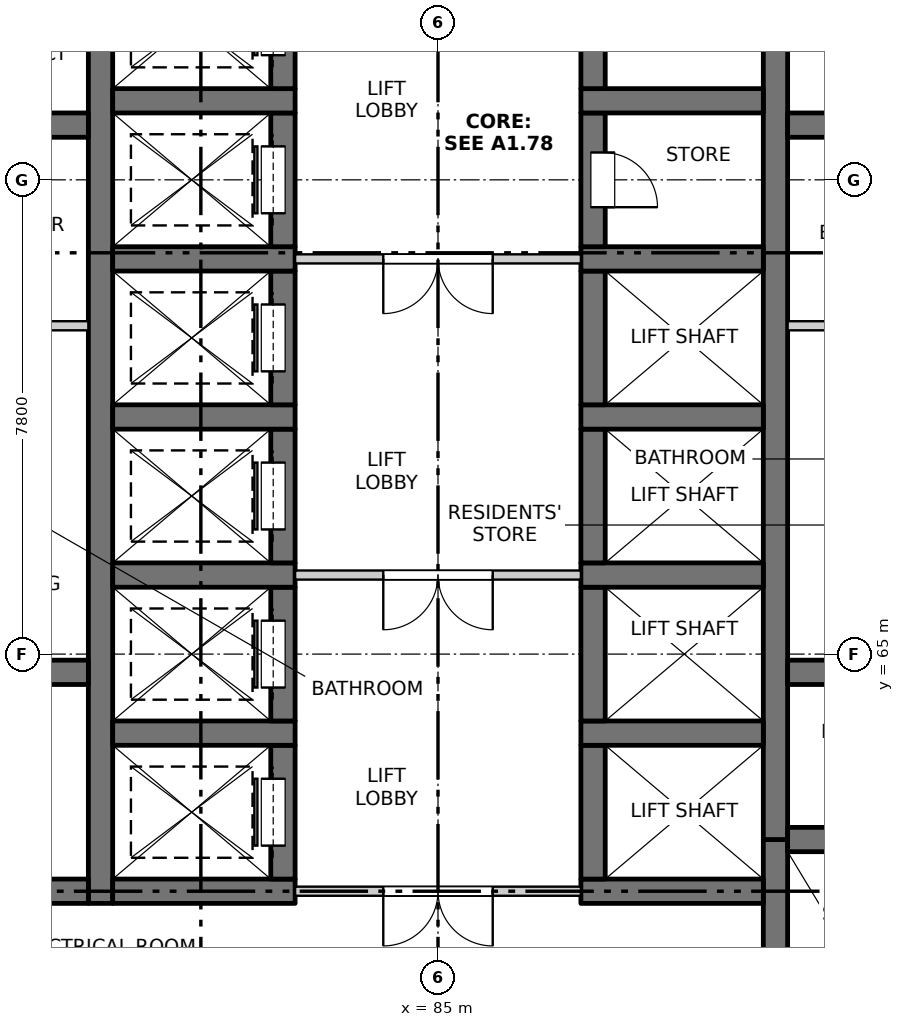
"""IFC4 building model, lengths in metres.
Left out: names, types, materials, properties, quantities, classifications, styles, units other than length and angle.
Written with IfcOpenShell. Run it as: python <this file> out.ifc"""

import sys

from ifc_helpers import new_model, si_unit, direction, frame, frame_2d, origin, place, context, subcontext, project, spatial, rectangle, extrude, element, fill, save


model = new_model("IFC4")
c1 = context("Model", 3, precision=1e-05, world=origin(), true_north=direction((0.0, 1.0)))
c2 = subcontext(c1, "Body", "Model", "MODEL_VIEW")
j1 = project(units=[si_unit("LENGTHUNIT", "METRE"), si_unit("PLANEANGLEUNIT", "RADIAN")], contexts=[c1])
p1 = place(None, origin())
s1 = spatial("IfcSite", under=j1, at=p1, CompositionType="ELEMENT")
p2 = place(p1, origin())
s2 = spatial("IfcBuilding", under=s1, at=p2, CompositionType="ELEMENT")
p3 = place(p2, frame((0.0, 0.0, 58.0)))
s3 = spatial("IfcBuildingStorey", under=s2, at=p3, CompositionType="ELEMENT", Elevation=58.0)
p4 = place(p3, frame((79.45, 60.9, -0.25), z_axis=(0.0, 0.0, 1.0), x_axis=(0.0, 1.0, 0.0)))
e1 = element("IfcWall", 1, at=p4, inside=s3, PredefinedType="SOLIDWALL", context=c2, shape_type="SweptSolid", body=[
    extrude(rectangle(XDim=16.4, YDim=0.4, at=frame_2d((8.2, 0.0))), origin(), (0.0, 0.0, 1.0), 3.4),
])
p5 = place(p3, frame((90.55, 55.6, -0.25), z_axis=(0.0, 0.0, 1.0), x_axis=(0.0, 1.0, 0.0)))
e2 = element("IfcWall", 2, at=p5, inside=s3, PredefinedType="SOLIDWALL", context=c2, shape_type="SweptSolid", body=[
    extrude(rectangle(XDim=6.35, YDim=0.4, at=frame_2d((3.175, 0.0))), origin(), (0.0, 0.0, 1.0), 3.4),
])
p6 = place(p5, frame((0.1, 0.0, 0.25)))
e3 = element("IfcOpeningElement", 3, at=p6, cuts=e2, PredefinedType="OPENING", context=c2, shape_type="SweptSolid", body=[
    extrude(rectangle(XDim=1.2, YDim=2.1, at=frame_2d((0.6, 1.05))), frame((0.0, 0.21, 0.0), z_axis=(0.0, -1.0, 0.0), x_axis=(1.0, 0.0, 0.0)), (0.0, 0.0, 1.0), 0.42),
])
p7 = place(p3, frame((90.55, 61.95, -0.25), z_axis=(0.0, 0.0, 1.0), x_axis=(0.0, 1.0, 0.0)))
e4 = element("IfcWall", 4, at=p7, inside=s3, PredefinedType="SOLIDWALL", context=c2, shape_type="SweptSolid", body=[
    extrude(rectangle(XDim=15.35, YDim=0.4, at=frame_2d((7.675, 0.0))), origin(), (0.0, 0.0, 1.0), 3.4),
])
p8 = place(p3, frame((79.65, 61.1, -0.25), z_axis=(0.0, 0.0, 1.0), x_axis=(1.0, 0.0, 0.0)))
e5 = element("IfcWall", 5, at=p8, inside=s3, PredefinedType="SOLIDWALL", context=c2, shape_type="SweptSolid", body=[
    extrude(rectangle(XDim=3.0, YDim=0.4, at=frame_2d((1.5, 0.0))), origin(), (0.0, 0.0, 1.0), 3.4),
])
p9 = place(p3, frame((82.45, 61.3, -0.25), z_axis=(0.0, 0.0, 1.0), x_axis=(0.0, 1.0, 0.0)))
e6 = element("IfcWall", 6, at=p9, inside=s3, PredefinedType="SOLIDWALL", context=c2, shape_type="SweptSolid", body=[
    extrude(rectangle(XDim=2.2, YDim=0.4, at=frame_2d((1.1, 0.0))), origin(), (0.0, 0.0, 1.0), 3.4),
])
p10 = place(p9, frame((0.55, 0.0, 0.25)))
e7 = element("IfcOpeningElement", 7, at=p10, cuts=e6, PredefinedType="OPENING", context=c2, shape_type="SweptSolid", body=[
    extrude(rectangle(XDim=1.1, YDim=2.1, at=frame_2d((0.55, 1.05))), frame((0.0, 0.21, 0.0), z_axis=(0.0, -1.0, 0.0), x_axis=(1.0, 0.0, 0.0)), (0.0, 0.0, 1.0), 0.42),
])
p11 = place(p3, frame((79.65, 63.7, -0.25), z_axis=(0.0, 0.0, 1.0), x_axis=(1.0, 0.0, 0.0)))
e8 = element("IfcWall", 8, at=p11, inside=s3, PredefinedType="SOLIDWALL", context=c2, shape_type="SweptSolid", body=[
    extrude(rectangle(XDim=3.0, YDim=0.4, at=frame_2d((1.5, 0.0))), origin(), (0.0, 0.0, 1.0), 3.4),
])
p12 = place(p3, frame((82.45, 63.9, -0.25), z_axis=(0.0, 0.0, 1.0), x_axis=(0.0, 1.0, 0.0)))
e9 = element("IfcWall", 9, at=p12, inside=s3, PredefinedType="SOLIDWALL", context=c2, shape_type="SweptSolid", body=[
    extrude(rectangle(XDim=2.2, YDim=0.4, at=frame_2d((1.1, 0.0))), origin(), (0.0, 0.0, 1.0), 3.4),
])
p13 = place(p12, frame((0.55, 0.0, 0.25)))
e10 = element("IfcOpeningElement", 10, at=p13, cuts=e9, PredefinedType="OPENING", context=c2, shape_type="SweptSolid", body=[
    extrude(rectangle(XDim=1.1, YDim=2.1, at=frame_2d((0.55, 1.05))), frame((0.0, 0.21, 0.0), z_axis=(0.0, -1.0, 0.0), x_axis=(1.0, 0.0, 0.0)), (0.0, 0.0, 1.0), 0.42),
])
p14 = place(p3, frame((79.65, 66.3, -0.25), z_axis=(0.0, 0.0, 1.0), x_axis=(1.0, 0.0, 0.0)))
e11 = element("IfcWall", 11, at=p14, inside=s3, PredefinedType="SOLIDWALL", context=c2, shape_type="SweptSolid", body=[
    extrude(rectangle(XDim=3.0, YDim=0.4, at=frame_2d((1.5, 0.0))), origin(), (0.0, 0.0, 1.0), 3.4),
])
p15 = place(p3, frame((82.45, 66.5, -0.25), z_axis=(0.0, 0.0, 1.0), x_axis=(0.0, 1.0, 0.0)))
e12 = element("IfcWall", 12, at=p15, inside=s3, PredefinedType="SOLIDWALL", context=c2, shape_type="SweptSolid", body=[
    extrude(rectangle(XDim=2.2, YDim=0.4, at=frame_2d((1.1, 0.0))), origin(), (0.0, 0.0, 1.0), 3.4),
])
p16 = place(p15, frame((0.55, 0.0, 0.25)))
e13 = element("IfcOpeningElement", 13, at=p16, cuts=e12, PredefinedType="OPENING", context=c2, shape_type="SweptSolid", body=[
    extrude(rectangle(XDim=1.1, YDim=2.1, at=frame_2d((0.55, 1.05))), frame((0.0, 0.21, 0.0), z_axis=(0.0, -1.0, 0.0), x_axis=(1.0, 0.0, 0.0)), (0.0, 0.0, 1.0), 0.42),
])
p17 = place(p3, frame((79.65, 68.9, -0.25), z_axis=(0.0, 0.0, 1.0), x_axis=(1.0, 0.0, 0.0)))
e14 = element("IfcWall", 14, at=p17, inside=s3, PredefinedType="SOLIDWALL", context=c2, shape_type="SweptSolid", body=[
    extrude(rectangle(XDim=3.0, YDim=0.4, at=frame_2d((1.5, 0.0))), origin(), (0.0, 0.0, 1.0), 3.4),
])
p18 = place(p3, frame((82.45, 69.1, -0.25), z_axis=(0.0, 0.0, 1.0), x_axis=(0.0, 1.0, 0.0)))
e15 = element("IfcWall", 15, at=p18, inside=s3, PredefinedType="SOLIDWALL", context=c2, shape_type="SweptSolid", body=[
    extrude(rectangle(XDim=2.2, YDim=0.4, at=frame_2d((1.1, 0.0))), origin(), (0.0, 0.0, 1.0), 3.4),
])
p19 = place(p18, frame((0.55, 0.0, 0.25)))
e16 = element("IfcOpeningElement", 16, at=p19, cuts=e15, PredefinedType="OPENING", context=c2, shape_type="SweptSolid", body=[
    extrude(rectangle(XDim=1.1, YDim=2.1, at=frame_2d((0.55, 1.05))), frame((0.0, 0.21, 0.0), z_axis=(0.0, -1.0, 0.0), x_axis=(1.0, 0.0, 0.0)), (0.0, 0.0, 1.0), 0.42),
])
p20 = place(p3, frame((79.65, 71.5, -0.25), z_axis=(0.0, 0.0, 1.0), x_axis=(1.0, 0.0, 0.0)))
e17 = element("IfcWall", 17, at=p20, inside=s3, PredefinedType="SOLIDWALL", context=c2, shape_type="SweptSolid", body=[
    extrude(rectangle(XDim=3.0, YDim=0.4, at=frame_2d((1.5, 0.0))), origin(), (0.0, 0.0, 1.0), 3.4),
])
p21 = place(p3, frame((82.45, 71.7, -0.25), z_axis=(0.0, 0.0, 1.0), x_axis=(0.0, 1.0, 0.0)))
e18 = element("IfcWall", 18, at=p21, inside=s3, PredefinedType="SOLIDWALL", context=c2, shape_type="SweptSolid", body=[
    extrude(rectangle(XDim=2.2, YDim=0.4, at=frame_2d((1.1, 0.0))), origin(), (0.0, 0.0, 1.0), 3.4),
])
p22 = place(p21, frame((0.55, 0.0, 0.25)))
e19 = element("IfcOpeningElement", 19, at=p22, cuts=e18, PredefinedType="OPENING", context=c2, shape_type="SweptSolid", body=[
    extrude(rectangle(XDim=1.1, YDim=2.1, at=frame_2d((0.55, 1.05))), frame((0.0, 0.21, 0.0), z_axis=(0.0, -1.0, 0.0), x_axis=(1.0, 0.0, 0.0)), (0.0, 0.0, 1.0), 0.42),
])
p23 = place(p3, frame((79.65, 74.1, -0.25), z_axis=(0.0, 0.0, 1.0), x_axis=(1.0, 0.0, 0.0)))
e20 = element("IfcWall", 20, at=p23, inside=s3, PredefinedType="SOLIDWALL", context=c2, shape_type="SweptSolid", body=[
    extrude(rectangle(XDim=3.0, YDim=0.4, at=frame_2d((1.5, 0.0))), origin(), (0.0, 0.0, 1.0), 3.4),
])
p24 = place(p3, frame((82.45, 74.3, -0.25), z_axis=(0.0, 0.0, 1.0), x_axis=(0.0, 1.0, 0.0)))
e21 = element("IfcWall", 21, at=p24, inside=s3, PredefinedType="SOLIDWALL", context=c2, shape_type="SweptSolid", body=[
    extrude(rectangle(XDim=2.2, YDim=0.4, at=frame_2d((1.1, 0.0))), origin(), (0.0, 0.0, 1.0), 3.4),
])
p25 = place(p24, frame((0.55, 0.0, 0.25)))
e22 = element("IfcOpeningElement", 22, at=p25, cuts=e21, PredefinedType="OPENING", context=c2, shape_type="SweptSolid", body=[
    extrude(rectangle(XDim=1.1, YDim=2.1, at=frame_2d((0.55, 1.05))), frame((0.0, 0.21, 0.0), z_axis=(0.0, -1.0, 0.0), x_axis=(1.0, 0.0, 0.0)), (0.0, 0.0, 1.0), 0.42),
])
p26 = place(p3, frame((87.35, 61.1, -0.25), z_axis=(0.0, 0.0, 1.0), x_axis=(1.0, 0.0, 0.0)))
e23 = element("IfcWall", 23, at=p26, inside=s3, PredefinedType="SOLIDWALL", context=c2, shape_type="SweptSolid", body=[
    extrude(rectangle(XDim=3.0, YDim=0.4, at=frame_2d((1.5, 0.0))), origin(), (0.0, 0.0, 1.0), 3.4),
])
p27 = place(p3, frame((87.55, 61.3, -0.25), z_axis=(0.0, 0.0, 1.0), x_axis=(0.0, 1.0, 0.0)))
e24 = element("IfcWall", 24, at=p27, inside=s3, PredefinedType="SOLIDWALL", context=c2, shape_type="SweptSolid", body=[
    extrude(rectangle(XDim=2.2, YDim=0.4, at=frame_2d((1.1, 0.0))), origin(), (0.0, 0.0, 1.0), 3.4),
])
p28 = place(p3, frame((87.35, 63.7, -0.25), z_axis=(0.0, 0.0, 1.0), x_axis=(1.0, 0.0, 0.0)))
e25 = element("IfcWall", 25, at=p28, inside=s3, PredefinedType="SOLIDWALL", context=c2, shape_type="SweptSolid", body=[
    extrude(rectangle(XDim=3.0, YDim=0.4, at=frame_2d((1.5, 0.0))), origin(), (0.0, 0.0, 1.0), 3.4),
])
p29 = place(p3, frame((87.55, 63.9, -0.25), z_axis=(0.0, 0.0, 1.0), x_axis=(0.0, 1.0, 0.0)))
e26 = element("IfcWall", 26, at=p29, inside=s3, PredefinedType="SOLIDWALL", context=c2, shape_type="SweptSolid", body=[
    extrude(rectangle(XDim=2.2, YDim=0.4, at=frame_2d((1.1, 0.0))), origin(), (0.0, 0.0, 1.0), 3.4),
])
p30 = place(p3, frame((87.35, 66.3, -0.25), z_axis=(0.0, 0.0, 1.0), x_axis=(1.0, 0.0, 0.0)))
e27 = element("IfcWall", 27, at=p30, inside=s3, PredefinedType="SOLIDWALL", context=c2, shape_type="SweptSolid", body=[
    extrude(rectangle(XDim=3.0, YDim=0.4, at=frame_2d((1.5, 0.0))), origin(), (0.0, 0.0, 1.0), 3.4),
])
p31 = place(p3, frame((87.55, 66.5, -0.25), z_axis=(0.0, 0.0, 1.0), x_axis=(0.0, 1.0, 0.0)))
e28 = element("IfcWall", 28, at=p31, inside=s3, PredefinedType="SOLIDWALL", context=c2, shape_type="SweptSolid", body=[
    extrude(rectangle(XDim=2.2, YDim=0.4, at=frame_2d((1.1, 0.0))), origin(), (0.0, 0.0, 1.0), 3.4),
])
p32 = place(p3, frame((87.35, 68.9, -0.25), z_axis=(0.0, 0.0, 1.0), x_axis=(1.0, 0.0, 0.0)))
e29 = element("IfcWall", 29, at=p32, inside=s3, PredefinedType="SOLIDWALL", context=c2, shape_type="SweptSolid", body=[
    extrude(rectangle(XDim=3.0, YDim=0.4, at=frame_2d((1.5, 0.0))), origin(), (0.0, 0.0, 1.0), 3.4),
])
p33 = place(p3, frame((87.55, 69.1, -0.25), z_axis=(0.0, 0.0, 1.0), x_axis=(0.0, 1.0, 0.0)))
e30 = element("IfcWall", 30, at=p33, inside=s3, PredefinedType="SOLIDWALL", context=c2, shape_type="SweptSolid", body=[
    extrude(rectangle(XDim=2.2, YDim=0.4, at=frame_2d((1.1, 0.0))), origin(), (0.0, 0.0, 1.0), 3.4),
])
p34 = place(p3, frame((87.35, 71.5, -0.25), z_axis=(0.0, 0.0, 1.0), x_axis=(1.0, 0.0, 0.0)))
e31 = element("IfcWall", 31, at=p34, inside=s3, PredefinedType="SOLIDWALL", context=c2, shape_type="SweptSolid", body=[
    extrude(rectangle(XDim=3.0, YDim=0.4, at=frame_2d((1.5, 0.0))), origin(), (0.0, 0.0, 1.0), 3.4),
])
p35 = place(p3, frame((87.55, 71.7, -0.25), z_axis=(0.0, 0.0, 1.0), x_axis=(0.0, 1.0, 0.0)))
e32 = element("IfcWall", 32, at=p35, inside=s3, PredefinedType="SOLIDWALL", context=c2, shape_type="SweptSolid", body=[
    extrude(rectangle(XDim=2.2, YDim=0.4, at=frame_2d((1.1, 0.0))), origin(), (0.0, 0.0, 1.0), 3.4),
])
p36 = place(p35, frame((0.65, 0.0, 0.25)))
e33 = element("IfcOpeningElement", 33, at=p36, cuts=e32, PredefinedType="OPENING", context=c2, shape_type="SweptSolid", body=[
    extrude(rectangle(XDim=0.9, YDim=2.1, at=frame_2d((0.45, 1.05))), frame((0.0, 0.21, 0.0), z_axis=(0.0, -1.0, 0.0), x_axis=(1.0, 0.0, 0.0)), (0.0, 0.0, 1.0), 0.42),
])
p37 = place(p3, frame((87.35, 74.1, -0.25), z_axis=(0.0, 0.0, 1.0), x_axis=(1.0, 0.0, 0.0)))
e34 = element("IfcWall", 34, at=p37, inside=s3, PredefinedType="SOLIDWALL", context=c2, shape_type="SweptSolid", body=[
    extrude(rectangle(XDim=3.0, YDim=0.4, at=frame_2d((1.5, 0.0))), origin(), (0.0, 0.0, 1.0), 3.4),
])
p38 = place(p3, frame((87.55, 74.3, -0.25), z_axis=(0.0, 0.0, 1.0), x_axis=(0.0, 1.0, 0.0)))
e35 = element("IfcWall", 35, at=p38, inside=s3, PredefinedType="SOLIDWALL", context=c2, shape_type="SweptSolid", body=[
    extrude(rectangle(XDim=2.2, YDim=0.4, at=frame_2d((1.1, 0.0))), origin(), (0.0, 0.0, 1.0), 3.4),
])
p39 = place(p38, frame((0.65, 0.0, 0.25)))
e36 = element("IfcOpeningElement", 36, at=p39, cuts=e35, PredefinedType="OPENING", context=c2, shape_type="SweptSolid", body=[
    extrude(rectangle(XDim=0.9, YDim=2.1, at=frame_2d((0.45, 1.05))), frame((0.0, 0.21, 0.0), z_axis=(0.0, -1.0, 0.0), x_axis=(1.0, 0.0, 0.0)), (0.0, 0.0, 1.0), 0.42),
])
for number, where, z_axis, x_axis in (
    (37, (75.6, 61.1, -0.25), (0.0, 0.0, 1.0), (1.0, 0.0, 0.0)),
    (38, (75.6, 64.7, -0.25), (0.0, 0.0, 1.0), (1.0, 0.0, 0.0)),
    (39, (75.6, 73.7, -0.25), (0.0, 0.0, 1.0), (1.0, 0.0, 0.0)),
    (40, (90.75, 61.95, -0.25), (0.0, 0.0, 1.0), (1.0, 0.0, 0.0)),
    (41, (90.75, 64.7, -0.25), (0.0, 0.0, 1.0), (1.0, 0.0, 0.0)),
    (42, (90.75, 73.7, -0.25), (0.0, 0.0, 1.0), (1.0, 0.0, 0.0)),
):
    element("IfcWall", number, at=place(p3, frame(where, z_axis=z_axis, x_axis=x_axis)), inside=s3, PredefinedType="SOLIDWALL", context=c2, shape_type="SweptSolid", body=[
        extrude(rectangle(XDim=3.65, YDim=0.4, at=frame_2d((1.825, 0.0))), origin(), (0.0, 0.0, 1.0), 3.4),
    ])
p40 = place(p3, frame((82.65, 61.1, 0.0), z_axis=(0.0, 0.0, 1.0), x_axis=(1.0, 0.0, 0.0)))
e43 = element("IfcWall", 43, at=p40, inside=s3, PredefinedType="PARTITIONING", context=c2, shape_type="SweptSolid", body=[
    extrude(rectangle(XDim=4.7, YDim=0.15, at=frame_2d((2.35, 0.0))), origin(), (0.0, 0.0, 1.0), 3.15),
])
p41 = place(p40, frame((1.45, 0.0, 0.0)))
e44 = element("IfcOpeningElement", 44, at=p41, cuts=e43, PredefinedType="OPENING", context=c2, shape_type="SweptSolid", body=[
    extrude(rectangle(XDim=1.8, YDim=2.1, at=frame_2d((0.9, 1.05))), frame((0.0, 0.085, 0.0), z_axis=(0.0, -1.0, 0.0), x_axis=(1.0, 0.0, 0.0)), (0.0, 0.0, 1.0), 0.17),
])
p42 = place(p3, frame((82.65, 66.3, 0.0), z_axis=(0.0, 0.0, 1.0), x_axis=(1.0, 0.0, 0.0)))
e45 = element("IfcWall", 45, at=p42, inside=s3, PredefinedType="PARTITIONING", context=c2, shape_type="SweptSolid", body=[
    extrude(rectangle(XDim=4.7, YDim=0.15, at=frame_2d((2.35, 0.0))), origin(), (0.0, 0.0, 1.0), 3.15),
])
p43 = place(p42, frame((1.45, 0.0, 0.0)))
e46 = element("IfcOpeningElement", 46, at=p43, cuts=e45, PredefinedType="OPENING", context=c2, shape_type="SweptSolid", body=[
    extrude(rectangle(XDim=1.8, YDim=2.1, at=frame_2d((0.9, 1.05))), frame((0.0, 0.085, 0.0), z_axis=(0.0, -1.0, 0.0), x_axis=(1.0, 0.0, 0.0)), (0.0, 0.0, 1.0), 0.17),
])
p44 = place(p3, frame((75.6, 70.4, 0.0), z_axis=(0.0, 0.0, 1.0), x_axis=(1.0, 0.0, 0.0)))
e47 = element("IfcWall", 47, at=p44, inside=s3, PredefinedType="PARTITIONING", context=c2, shape_type="SweptSolid", body=[
    extrude(rectangle(XDim=3.65, YDim=0.15, at=frame_2d((1.825, 0.0))), origin(), (0.0, 0.0, 1.0), 3.15),
])
p45 = place(p3, frame((90.75, 70.4, 0.0), z_axis=(0.0, 0.0, 1.0), x_axis=(1.0, 0.0, 0.0)))
e48 = element("IfcWall", 48, at=p45, inside=s3, PredefinedType="PARTITIONING", context=c2, shape_type="SweptSolid", body=[
    extrude(rectangle(XDim=3.65, YDim=0.15, at=frame_2d((1.825, 0.0))), origin(), (0.0, 0.0, 1.0), 3.15),
])
p46 = place(p3, frame((82.65, 71.5, 0.0), z_axis=(0.0, 0.0, 1.0), x_axis=(1.0, 0.0, 0.0)))
e49 = element("IfcWall", 49, at=p46, inside=s3, PredefinedType="PARTITIONING", context=c2, shape_type="SweptSolid", body=[
    extrude(rectangle(XDim=4.7, YDim=0.15, at=frame_2d((2.35, 0.0))), origin(), (0.0, 0.0, 1.0), 3.15),
])
p47 = place(p46, frame((1.45, 0.0, 0.0)))
e50 = element("IfcOpeningElement", 50, at=p47, cuts=e49, PredefinedType="OPENING", context=c2, shape_type="SweptSolid", body=[
    extrude(rectangle(XDim=1.8, YDim=2.1, at=frame_2d((0.9, 1.05))), frame((0.0, 0.085, 0.0), z_axis=(0.0, -1.0, 0.0), x_axis=(1.0, 0.0, 0.0)), (0.0, 0.0, 1.0), 0.17),
])
p48 = place(p41, origin())
e51 = element("IfcDoor", 51, at=p48, inside=s3, OperationType="DOUBLE_DOOR_SINGLE_SWING", PredefinedType="DOOR", context=c2, shape_type="SweptSolid", body=[
    extrude(rectangle(XDim=1.8, YDim=2.1, at=frame_2d((0.9, 1.05))), frame((0.0, 0.025, 0.0), z_axis=(0.0, -1.0, 0.0), x_axis=(1.0, 0.0, 0.0)), (0.0, 0.0, 1.0), 0.05),
])
fill(e44, e51)
p49 = place(p10, origin())
e52 = element("IfcDoor", 52, at=p49, inside=s3, OperationType="SLIDING_TO_RIGHT", PredefinedType="DOOR", context=c2, shape_type="SweptSolid", body=[
    extrude(rectangle(XDim=1.1, YDim=2.1, at=frame_2d((0.55, 1.05))), frame((0.0, 0.185, 0.0), z_axis=(0.0, -1.0, 0.0), x_axis=(1.0, 0.0, 0.0)), (0.0, 0.0, 1.0), 0.05),
])
fill(e7, e52)
p50 = place(p13, origin())
e53 = element("IfcDoor", 53, at=p50, inside=s3, OperationType="SLIDING_TO_RIGHT", PredefinedType="DOOR", context=c2, shape_type="SweptSolid", body=[
    extrude(rectangle(XDim=1.1, YDim=2.1, at=frame_2d((0.55, 1.05))), frame((0.0, 0.185, 0.0), z_axis=(0.0, -1.0, 0.0), x_axis=(1.0, 0.0, 0.0)), (0.0, 0.0, 1.0), 0.05),
])
fill(e10, e53)
p51 = place(p43, origin())
e54 = element("IfcDoor", 54, at=p51, inside=s3, OperationType="DOUBLE_DOOR_SINGLE_SWING", PredefinedType="DOOR", context=c2, shape_type="SweptSolid", body=[
    extrude(rectangle(XDim=1.8, YDim=2.1, at=frame_2d((0.9, 1.05))), frame((0.0, 0.025, 0.0), z_axis=(0.0, -1.0, 0.0), x_axis=(1.0, 0.0, 0.0)), (0.0, 0.0, 1.0), 0.05),
])
fill(e46, e54)
p52 = place(p16, origin())
e55 = element("IfcDoor", 55, at=p52, inside=s3, OperationType="SLIDING_TO_RIGHT", PredefinedType="DOOR", context=c2, shape_type="SweptSolid", body=[
    extrude(rectangle(XDim=1.1, YDim=2.1, at=frame_2d((0.55, 1.05))), frame((0.0, 0.185, 0.0), z_axis=(0.0, -1.0, 0.0), x_axis=(1.0, 0.0, 0.0)), (0.0, 0.0, 1.0), 0.05),
])
fill(e13, e55)
p53 = place(p19, origin())
e56 = element("IfcDoor", 56, at=p53, inside=s3, OperationType="SLIDING_TO_LEFT", PredefinedType="DOOR", context=c2, shape_type="SweptSolid", body=[
    extrude(rectangle(XDim=1.1, YDim=2.1, at=frame_2d((0.55, 1.05))), frame((0.0, 0.185, 0.0), z_axis=(0.0, -1.0, 0.0), x_axis=(1.0, 0.0, 0.0)), (0.0, 0.0, 1.0), 0.05),
])
fill(e16, e56)
p54 = place(p47, origin())
e57 = element("IfcDoor", 57, at=p54, inside=s3, OperationType="DOUBLE_DOOR_SINGLE_SWING", PredefinedType="DOOR", context=c2, shape_type="SweptSolid", body=[
    extrude(rectangle(XDim=1.8, YDim=2.1, at=frame_2d((0.9, 1.05))), frame((0.0, 0.025, 0.0), z_axis=(0.0, -1.0, 0.0), x_axis=(1.0, 0.0, 0.0)), (0.0, 0.0, 1.0), 0.05),
])
fill(e50, e57)
p55 = place(p22, origin())
e58 = element("IfcDoor", 58, at=p55, inside=s3, OperationType="SLIDING_TO_LEFT", PredefinedType="DOOR", context=c2, shape_type="SweptSolid", body=[
    extrude(rectangle(XDim=1.1, YDim=2.1, at=frame_2d((0.55, 1.05))), frame((0.0, 0.185, 0.0), z_axis=(0.0, -1.0, 0.0), x_axis=(1.0, 0.0, 0.0)), (0.0, 0.0, 1.0), 0.05),
])
fill(e19, e58)
p56 = place(p36, origin())
e59 = element("IfcDoor", 59, at=p56, inside=s3, OperationType="SINGLE_SWING_RIGHT", PredefinedType="DOOR", context=c2, shape_type="SweptSolid", body=[
    extrude(rectangle(XDim=0.9, YDim=2.1, at=frame_2d((0.45, 1.05))), frame((0.0, -0.135, 0.0), z_axis=(0.0, -1.0, 0.0), x_axis=(1.0, 0.0, 0.0)), (0.0, 0.0, 1.0), 0.05),
])
fill(e33, e59)
p57 = place(p25, origin())
e60 = element("IfcDoor", 60, at=p57, inside=s3, OperationType="SLIDING_TO_LEFT", PredefinedType="DOOR", context=c2, shape_type="SweptSolid", body=[
    extrude(rectangle(XDim=1.1, YDim=2.1, at=frame_2d((0.55, 1.05))), frame((0.0, 0.185, 0.0), z_axis=(0.0, -1.0, 0.0), x_axis=(1.0, 0.0, 0.0)), (0.0, 0.0, 1.0), 0.05),
])
fill(e22, e60)
save(model, sys.argv[1])
